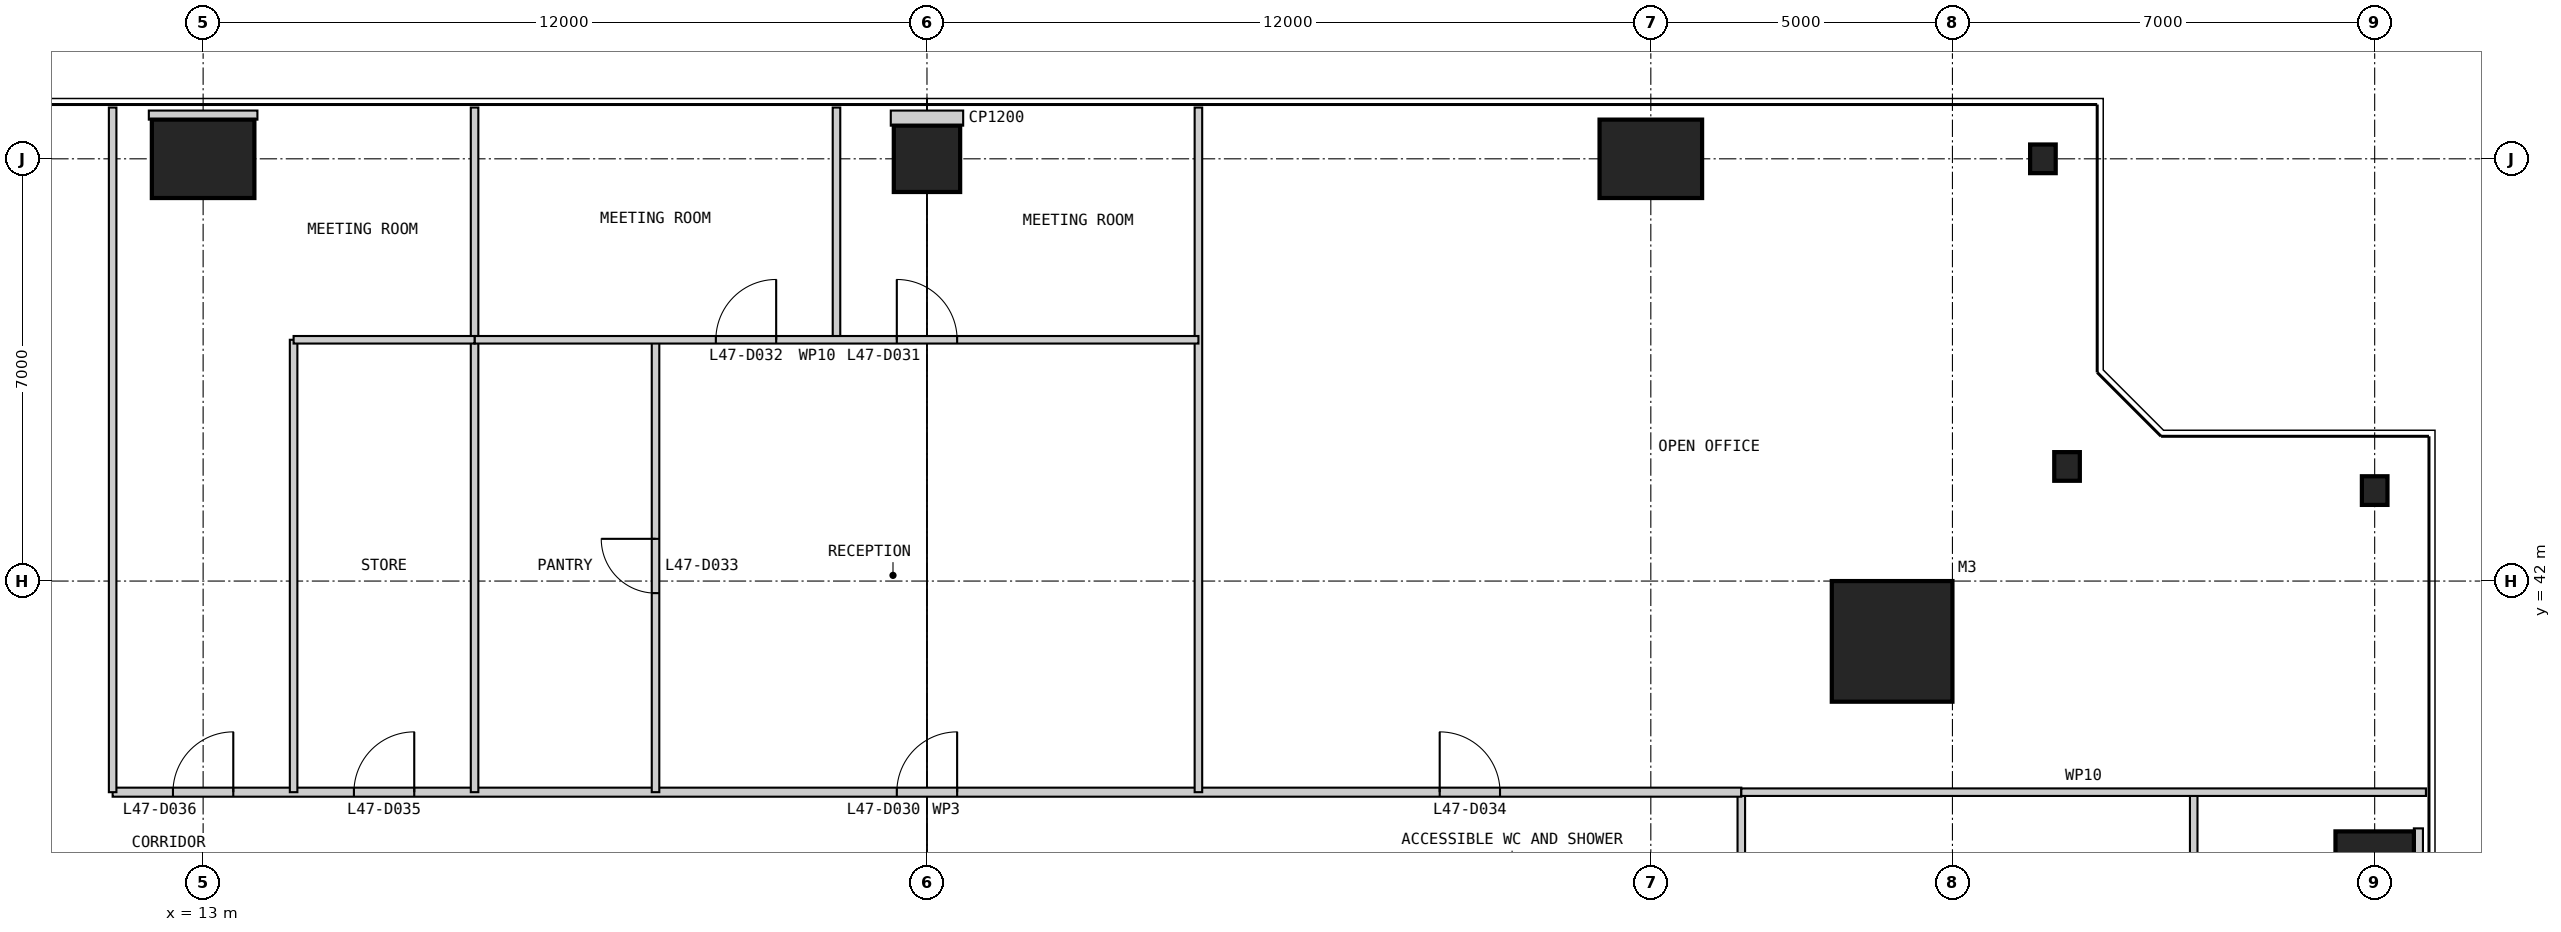
"""IFC4 building model, lengths in metres.
Left out: names, types, materials, properties, quantities, classifications, styles, units other than length and angle.
Written with IfcOpenShell. Run it as: python <this file> out.ifc"""

import sys

from ifc_helpers import new_model, si_unit, direction, frame, frame_2d, origin, origin_2d, place, context, subcontext, project, spatial, rectangle, i_section, extrude, element, fill, save


model = new_model("IFC4")
c1 = context("Model", 3, precision=1e-05, world=origin(), true_north=direction((0.0, 1.0)))
c2 = subcontext(c1, "Body", "Model", "MODEL_VIEW")
j1 = project(units=[si_unit("LENGTHUNIT", "METRE"), si_unit("PLANEANGLEUNIT", "RADIAN")], contexts=[c1])
p1 = place(None, origin())
s1 = spatial("IfcSite", under=j1, at=p1, CompositionType="ELEMENT")
p2 = place(p1, origin())
s2 = spatial("IfcBuilding", under=s1, at=p2, CompositionType="ELEMENT")
p3 = place(p2, frame((0.0, 0.0, 201.8)))
s3 = spatial("IfcBuildingStorey", under=s2, at=p3, CompositionType="ELEMENT", Elevation=201.8)
p4 = place(p3, frame((41.0, 41.0, 0.0), z_axis=(0.0, 0.0, 1.0), x_axis=(1.0, 0.0, 0.0)))
e1 = element("IfcColumn", 1, at=p4, inside=s3, PredefinedType="COLUMN", context=c2, shape_type="SweptSolid", body=[
    extrude(rectangle(XDim=2.0, YDim=2.0, at=origin_2d()), origin(), (0.0, 0.0, 1.0), 4.0),
])
p5 = place(p3, frame((49.0, 37.0, 0.0), z_axis=(0.0, 0.0, 1.0), x_axis=(1.0, 0.0, 0.0)))
e2 = element("IfcColumn", 2, at=p5, inside=s3, PredefinedType="COLUMN", context=c2, shape_type="SweptSolid", body=[
    extrude(rectangle(XDim=1.3, YDim=1.7, at=origin_2d()), origin(), (0.0, 0.0, 1.0), 4.0),
])
for number, where, z_axis, x_axis in (
    (3, (49.0, 43.5, 0.0), (0.0, 0.0, 1.0), (1.0, 0.0, 0.0)),
    (4, (43.9, 43.9, 0.0), (0.0, 0.0, 1.0), (1.0, 0.0, 0.0)),
    (5, (43.5, 49.0, 0.0), (0.0, 0.0, 1.0), (1.0, 0.0, 0.0)),
):
    element("IfcColumn", number, at=place(p3, frame(where, z_axis=z_axis, x_axis=x_axis)), inside=s3, PredefinedType="COLUMN", context=c2, shape_type="SweptSolid", body=[
        extrude(i_section(OverallWidth=0.424, OverallDepth=0.475, WebThickness=0.048, FlangeThickness=0.077, at=origin_2d()), origin(), (0.0, 0.0, 1.0), 4.0),
    ])
p6 = place(p3, frame((37.0, 49.0, 0.0), z_axis=(0.0, 0.0, 1.0), x_axis=(1.0, 0.0, 0.0)))
e6 = element("IfcColumn", 6, at=p6, inside=s3, PredefinedType="COLUMN", context=c2, shape_type="SweptSolid", body=[
    extrude(rectangle(XDim=1.7, YDim=1.3, at=origin_2d()), origin(), (0.0, 0.0, 1.0), 4.0),
])
p7 = place(p3, frame((25.0, 49.0, 0.0), z_axis=(0.0, 0.0, 1.0), x_axis=(1.0, 0.0, 0.0)))
e7 = element("IfcColumn", 7, at=p7, inside=s3, PredefinedType="COLUMN", context=c2, shape_type="SweptSolid", body=[
    extrude(rectangle(XDim=1.1, YDim=1.1, at=origin_2d()), origin(), (0.0, 0.0, 1.0), 4.0),
])
p8 = place(p3, frame((13.0, 49.0, 0.0), z_axis=(0.0, 0.0, 1.0), x_axis=(1.0, 0.0, 0.0)))
e8 = element("IfcColumn", 8, at=p8, inside=s3, PredefinedType="COLUMN", context=c2, shape_type="SweptSolid", body=[
    extrude(rectangle(XDim=1.7, YDim=1.3, at=origin_2d()), origin(), (0.0, 0.0, 1.0), 4.0),
])
p9 = place(p3, frame((46.0, 32.5, 0.0), z_axis=(0.0, 0.0, 1.0), x_axis=(0.0, 1.0, 0.0)))
e9 = element("IfcWall", 9, at=p9, inside=s3, PredefinedType="PARTITIONING", context=c2, shape_type="SweptSolid", body=[
    extrude(rectangle(XDim=6.0, YDim=0.125, at=frame_2d((3.0, 0.0))), origin(), (0.0, 0.0, 1.0), 3.238),
])
p10 = place(p3, frame((38.5, 35.5, 0.0), z_axis=(0.0, 0.0, 1.0), x_axis=(0.0, 1.0, 0.0)))
e10 = element("IfcWall", 10, at=p10, inside=s3, PredefinedType="PARTITIONING", context=c2, shape_type="SweptSolid", body=[
    extrude(rectangle(XDim=3.0, YDim=0.125, at=frame_2d((1.5, 0.0))), origin(), (0.0, 0.0, 1.0), 3.85),
])
p11 = place(p3, frame((38.5, 38.5, 0.0), z_axis=(0.0, 0.0, 1.0), x_axis=(-1.0, 0.0, 0.0)))
e11 = element("IfcWall", 11, at=p11, inside=s3, PredefinedType="PARTITIONING", context=c2, shape_type="SweptSolid", body=[
    extrude(rectangle(XDim=27.0, YDim=0.15, at=frame_2d((13.5, 0.0))), origin(), (0.0, 0.0, 1.0), 3.85),
])
p12 = place(p11, frame((13.0, 0.0, 0.0)))
e12 = element("IfcOpeningElement", 12, at=p12, cuts=e11, PredefinedType="OPENING", context=c2, shape_type="SweptSolid", body=[
    extrude(rectangle(XDim=1.0, YDim=2.2, at=frame_2d((0.5, 1.1))), frame((0.0, 0.085, 0.0), z_axis=(0.0, -1.0, 0.0), x_axis=(1.0, 0.0, 0.0)), (0.0, 0.0, 1.0), 0.17),
])
p13 = place(p11, frame((4.0, 0.0, 0.0)))
e13 = element("IfcOpeningElement", 13, at=p13, cuts=e11, PredefinedType="OPENING", context=c2, shape_type="SweptSolid", body=[
    extrude(rectangle(XDim=1.0, YDim=2.2, at=frame_2d((0.5, 1.1))), frame((0.0, 0.085, 0.0), z_axis=(0.0, -1.0, 0.0), x_axis=(1.0, 0.0, 0.0)), (0.0, 0.0, 1.0), 0.17),
])
p14 = place(p11, frame((22.0, 0.0, 0.0)))
e14 = element("IfcOpeningElement", 14, at=p14, cuts=e11, PredefinedType="OPENING", context=c2, shape_type="SweptSolid", body=[
    extrude(rectangle(XDim=1.0, YDim=2.2, at=frame_2d((0.5, 1.1))), frame((0.0, 0.085, 0.0), z_axis=(0.0, -1.0, 0.0), x_axis=(1.0, 0.0, 0.0)), (0.0, 0.0, 1.0), 0.17),
])
p15 = place(p11, frame((25.0, 0.0, 0.0)))
e15 = element("IfcOpeningElement", 15, at=p15, cuts=e11, PredefinedType="OPENING", context=c2, shape_type="SweptSolid", body=[
    extrude(rectangle(XDim=1.0, YDim=2.2, at=frame_2d((0.5, 1.1))), frame((0.0, 0.085, 0.0), z_axis=(0.0, -1.0, 0.0), x_axis=(1.0, 0.0, 0.0)), (0.0, 0.0, 1.0), 0.17),
])
for number, where, z_axis, x_axis in (
    (16, (49.85, 38.5, 0.0), (0.0, 0.0, 1.0), (-1.0, 0.0, 0.0)),
    (17, (29.5, 49.85, 0.0), (0.0, 0.0, 1.0), (0.0, -1.0, 0.0)),
):
    element("IfcWall", number, at=place(p3, frame(where, z_axis=z_axis, x_axis=x_axis)), inside=s3, PredefinedType="PARTITIONING", context=c2, shape_type="SweptSolid", body=[
        extrude(rectangle(XDim=11.35, YDim=0.125, at=frame_2d((5.675, 0.0))), origin(), (0.0, 0.0, 1.0), 3.85),
    ])
p16 = place(p3, frame((23.5, 49.85, 0.0), z_axis=(0.0, 0.0, 1.0), x_axis=(0.0, -1.0, 0.0)))
e18 = element("IfcWall", 18, at=p16, inside=s3, PredefinedType="PARTITIONING", context=c2, shape_type="SweptSolid", body=[
    extrude(rectangle(XDim=3.85, YDim=0.125, at=frame_2d((1.925, 0.0))), origin(), (0.0, 0.0, 1.0), 3.85),
])
p17 = place(p3, frame((20.5, 46.0, 0.0), z_axis=(0.0, 0.0, 1.0), x_axis=(0.0, -1.0, 0.0)))
e19 = element("IfcWall", 19, at=p17, inside=s3, PredefinedType="PARTITIONING", context=c2, shape_type="SweptSolid", body=[
    extrude(rectangle(XDim=7.5, YDim=0.125, at=frame_2d((3.75, 0.0))), origin(), (0.0, 0.0, 1.0), 3.85),
])
p18 = place(p17, frame((3.3, 0.0, 0.0)))
e20 = element("IfcOpeningElement", 20, at=p18, cuts=e19, PredefinedType="OPENING", context=c2, shape_type="SweptSolid", body=[
    extrude(rectangle(XDim=0.9, YDim=2.2, at=frame_2d((0.45, 1.1))), frame((0.0, 0.073, 0.0), z_axis=(0.0, -1.0, 0.0), x_axis=(1.0, 0.0, 0.0)), (0.0, 0.0, 1.0), 0.145),
])
p19 = place(p3, frame((17.5, 49.85, 0.0), z_axis=(0.0, 0.0, 1.0), x_axis=(0.0, -1.0, 0.0)))
e21 = element("IfcWall", 21, at=p19, inside=s3, PredefinedType="PARTITIONING", context=c2, shape_type="SweptSolid", body=[
    extrude(rectangle(XDim=11.35, YDim=0.125, at=frame_2d((5.675, 0.0))), origin(), (0.0, 0.0, 1.0), 3.85),
])
p20 = place(p3, frame((14.5, 46.0, 0.0), z_axis=(0.0, 0.0, 1.0), x_axis=(0.0, -1.0, 0.0)))
e22 = element("IfcWall", 22, at=p20, inside=s3, PredefinedType="PARTITIONING", context=c2, shape_type="SweptSolid", body=[
    extrude(rectangle(XDim=7.5, YDim=0.125, at=frame_2d((3.75, 0.0))), origin(), (0.0, 0.0, 1.0), 3.85),
])
p21 = place(p3, frame((29.5, 46.0, 0.0), z_axis=(0.0, 0.0, 1.0), x_axis=(-1.0, 0.0, 0.0)))
e23 = element("IfcWall", 23, at=p21, inside=s3, PredefinedType="PARTITIONING", context=c2, shape_type="SweptSolid", body=[
    extrude(rectangle(XDim=12.0, YDim=0.125, at=frame_2d((6.0, 0.0))), origin(), (0.0, 0.0, 1.0), 3.85),
])
p22 = place(p21, frame((4.0, 0.0, 0.0)))
e24 = element("IfcOpeningElement", 24, at=p22, cuts=e23, PredefinedType="OPENING", context=c2, shape_type="SweptSolid", body=[
    extrude(rectangle(XDim=1.0, YDim=2.2, at=frame_2d((0.5, 1.1))), frame((0.0, 0.073, 0.0), z_axis=(0.0, -1.0, 0.0), x_axis=(1.0, 0.0, 0.0)), (0.0, 0.0, 1.0), 0.145),
])
p23 = place(p21, frame((7.0, 0.0, 0.0)))
e25 = element("IfcOpeningElement", 25, at=p23, cuts=e23, PredefinedType="OPENING", context=c2, shape_type="SweptSolid", body=[
    extrude(rectangle(XDim=1.0, YDim=2.2, at=frame_2d((0.5, 1.1))), frame((0.0, 0.073, 0.0), z_axis=(0.0, -1.0, 0.0), x_axis=(1.0, 0.0, 0.0)), (0.0, 0.0, 1.0), 0.145),
])
p24 = place(p3, frame((17.5, 46.0, 0.0), z_axis=(0.0, 0.0, 1.0), x_axis=(-1.0, 0.0, 0.0)))
e26 = element("IfcWall", 26, at=p24, inside=s3, PredefinedType="PARTITIONING", context=c2, shape_type="SweptSolid", body=[
    extrude(rectangle(XDim=3.0, YDim=0.125, at=frame_2d((1.5, 0.0))), origin(), (0.0, 0.0, 1.0), 3.85),
])
p25 = place(p3, frame((11.5, 49.85, 0.0), z_axis=(0.0, 0.0, 1.0), x_axis=(0.0, -1.0, 0.0)))
e27 = element("IfcWall", 27, at=p25, inside=s3, PredefinedType="PARTITIONING", context=c2, shape_type="SweptSolid", body=[
    extrude(rectangle(XDim=11.35, YDim=0.125, at=frame_2d((5.675, 0.0))), origin(), (0.0, 0.0, 1.0), 3.85),
])
p26 = place(p3, frame((49.8, 37.0, 0.0), z_axis=(0.0, 0.0, 1.0), x_axis=(-1.0, 0.0, 0.0)))
e28 = element("IfcWall", 28, at=p26, inside=s3, PredefinedType="PARTITIONING", context=c2, shape_type="SweptSolid", body=[
    extrude(rectangle(XDim=0.15, YDim=1.8, at=frame_2d((0.075, 0.0))), origin(), (0.0, 0.0, 1.0), 3.85),
])
p27 = place(p3, frame((25.0, 49.8, 0.0), z_axis=(0.0, 0.0, 1.0), x_axis=(0.0, -1.0, 0.0)))
e29 = element("IfcWall", 29, at=p27, inside=s3, PredefinedType="PARTITIONING", context=c2, shape_type="SweptSolid", body=[
    extrude(rectangle(XDim=0.25, YDim=1.2, at=frame_2d((0.125, 0.0))), origin(), (0.0, 0.0, 1.0), 3.85),
])
p28 = place(p3, frame((13.0, 49.8, 0.0), z_axis=(0.0, 0.0, 1.0), x_axis=(0.0, -1.0, 0.0)))
e30 = element("IfcWall", 30, at=p28, inside=s3, PredefinedType="PARTITIONING", context=c2, shape_type="SweptSolid", body=[
    extrude(rectangle(XDim=0.15, YDim=1.8, at=frame_2d((0.075, 0.0))), origin(), (0.0, 0.0, 1.0), 3.85),
])
p29 = place(p12, frame((1.0, 0.0, 0.0), z_axis=(0.0, 0.0, 1.0), x_axis=(-1.0, 0.0, 0.0)))
e31 = element("IfcDoor", 31, at=p29, inside=s3, OperationType="SINGLE_SWING_RIGHT", PredefinedType="DOOR", context=c2, shape_type="SweptSolid", body=[
    extrude(rectangle(XDim=1.0, YDim=2.2, at=frame_2d((0.5, 1.1))), frame((0.0, 0.025, 0.0), z_axis=(0.0, -1.0, 0.0), x_axis=(1.0, 0.0, 0.0)), (0.0, 0.0, 1.0), 0.05),
])
fill(e12, e31)
p30 = place(p22, frame((1.0, 0.0, 0.0), z_axis=(0.0, 0.0, 1.0), x_axis=(-1.0, 0.0, 0.0)))
e32 = element("IfcDoor", 32, at=p30, inside=s3, OperationType="SINGLE_SWING_LEFT", PredefinedType="DOOR", context=c2, shape_type="SweptSolid", body=[
    extrude(rectangle(XDim=1.0, YDim=2.2, at=frame_2d((0.5, 1.1))), frame((0.0, 0.025, 0.0), z_axis=(0.0, -1.0, 0.0), x_axis=(1.0, 0.0, 0.0)), (0.0, 0.0, 1.0), 0.05),
])
fill(e24, e32)
p31 = place(p23, frame((1.0, 0.0, 0.0), z_axis=(0.0, 0.0, 1.0), x_axis=(-1.0, 0.0, 0.0)))
e33 = element("IfcDoor", 33, at=p31, inside=s3, OperationType="SINGLE_SWING_RIGHT", PredefinedType="DOOR", context=c2, shape_type="SweptSolid", body=[
    extrude(rectangle(XDim=1.0, YDim=2.2, at=frame_2d((0.5, 1.1))), frame((0.0, 0.025, 0.0), z_axis=(0.0, -1.0, 0.0), x_axis=(1.0, 0.0, 0.0)), (0.0, 0.0, 1.0), 0.05),
])
fill(e25, e33)
p32 = place(p18, frame((0.9, 0.0, 0.0), z_axis=(0.0, 0.0, 1.0), x_axis=(-1.0, 0.0, 0.0)))
e34 = element("IfcDoor", 34, at=p32, inside=s3, OperationType="SINGLE_SWING_RIGHT", PredefinedType="DOOR", context=c2, shape_type="SweptSolid", body=[
    extrude(rectangle(XDim=0.9, YDim=2.2, at=frame_2d((0.45, 1.1))), frame((0.0, 0.025, 0.0), z_axis=(0.0, -1.0, 0.0), x_axis=(1.0, 0.0, 0.0)), (0.0, 0.0, 1.0), 0.05),
])
fill(e20, e34)
p33 = place(p13, frame((1.0, 0.0, 0.0), z_axis=(0.0, 0.0, 1.0), x_axis=(-1.0, 0.0, 0.0)))
e35 = element("IfcDoor", 35, at=p33, inside=s3, OperationType="SINGLE_SWING_LEFT", PredefinedType="DOOR", context=c2, shape_type="SweptSolid", body=[
    extrude(rectangle(XDim=1.0, YDim=2.2, at=frame_2d((0.5, 1.1))), frame((0.0, 0.025, 0.0), z_axis=(0.0, -1.0, 0.0), x_axis=(1.0, 0.0, 0.0)), (0.0, 0.0, 1.0), 0.05),
])
fill(e13, e35)
p34 = place(p14, frame((1.0, 0.0, 0.0), z_axis=(0.0, 0.0, 1.0), x_axis=(-1.0, 0.0, 0.0)))
e36 = element("IfcDoor", 36, at=p34, inside=s3, OperationType="SINGLE_SWING_RIGHT", PredefinedType="DOOR", context=c2, shape_type="SweptSolid", body=[
    extrude(rectangle(XDim=1.0, YDim=2.2, at=frame_2d((0.5, 1.1))), frame((0.0, 0.025, 0.0), z_axis=(0.0, -1.0, 0.0), x_axis=(1.0, 0.0, 0.0)), (0.0, 0.0, 1.0), 0.05),
])
fill(e14, e36)
p35 = place(p15, frame((1.0, 0.0, 0.0), z_axis=(0.0, 0.0, 1.0), x_axis=(-1.0, 0.0, 0.0)))
e37 = element("IfcDoor", 37, at=p35, inside=s3, OperationType="SINGLE_SWING_RIGHT", PredefinedType="DOOR", context=c2, shape_type="SweptSolid", body=[
    extrude(rectangle(XDim=1.0, YDim=2.2, at=frame_2d((0.5, 1.1))), frame((0.0, 0.025, 0.0), z_axis=(0.0, -1.0, 0.0), x_axis=(1.0, 0.0, 0.0)), (0.0, 0.0, 1.0), 0.05),
])
fill(e15, e37)
save(model, sys.argv[1])
